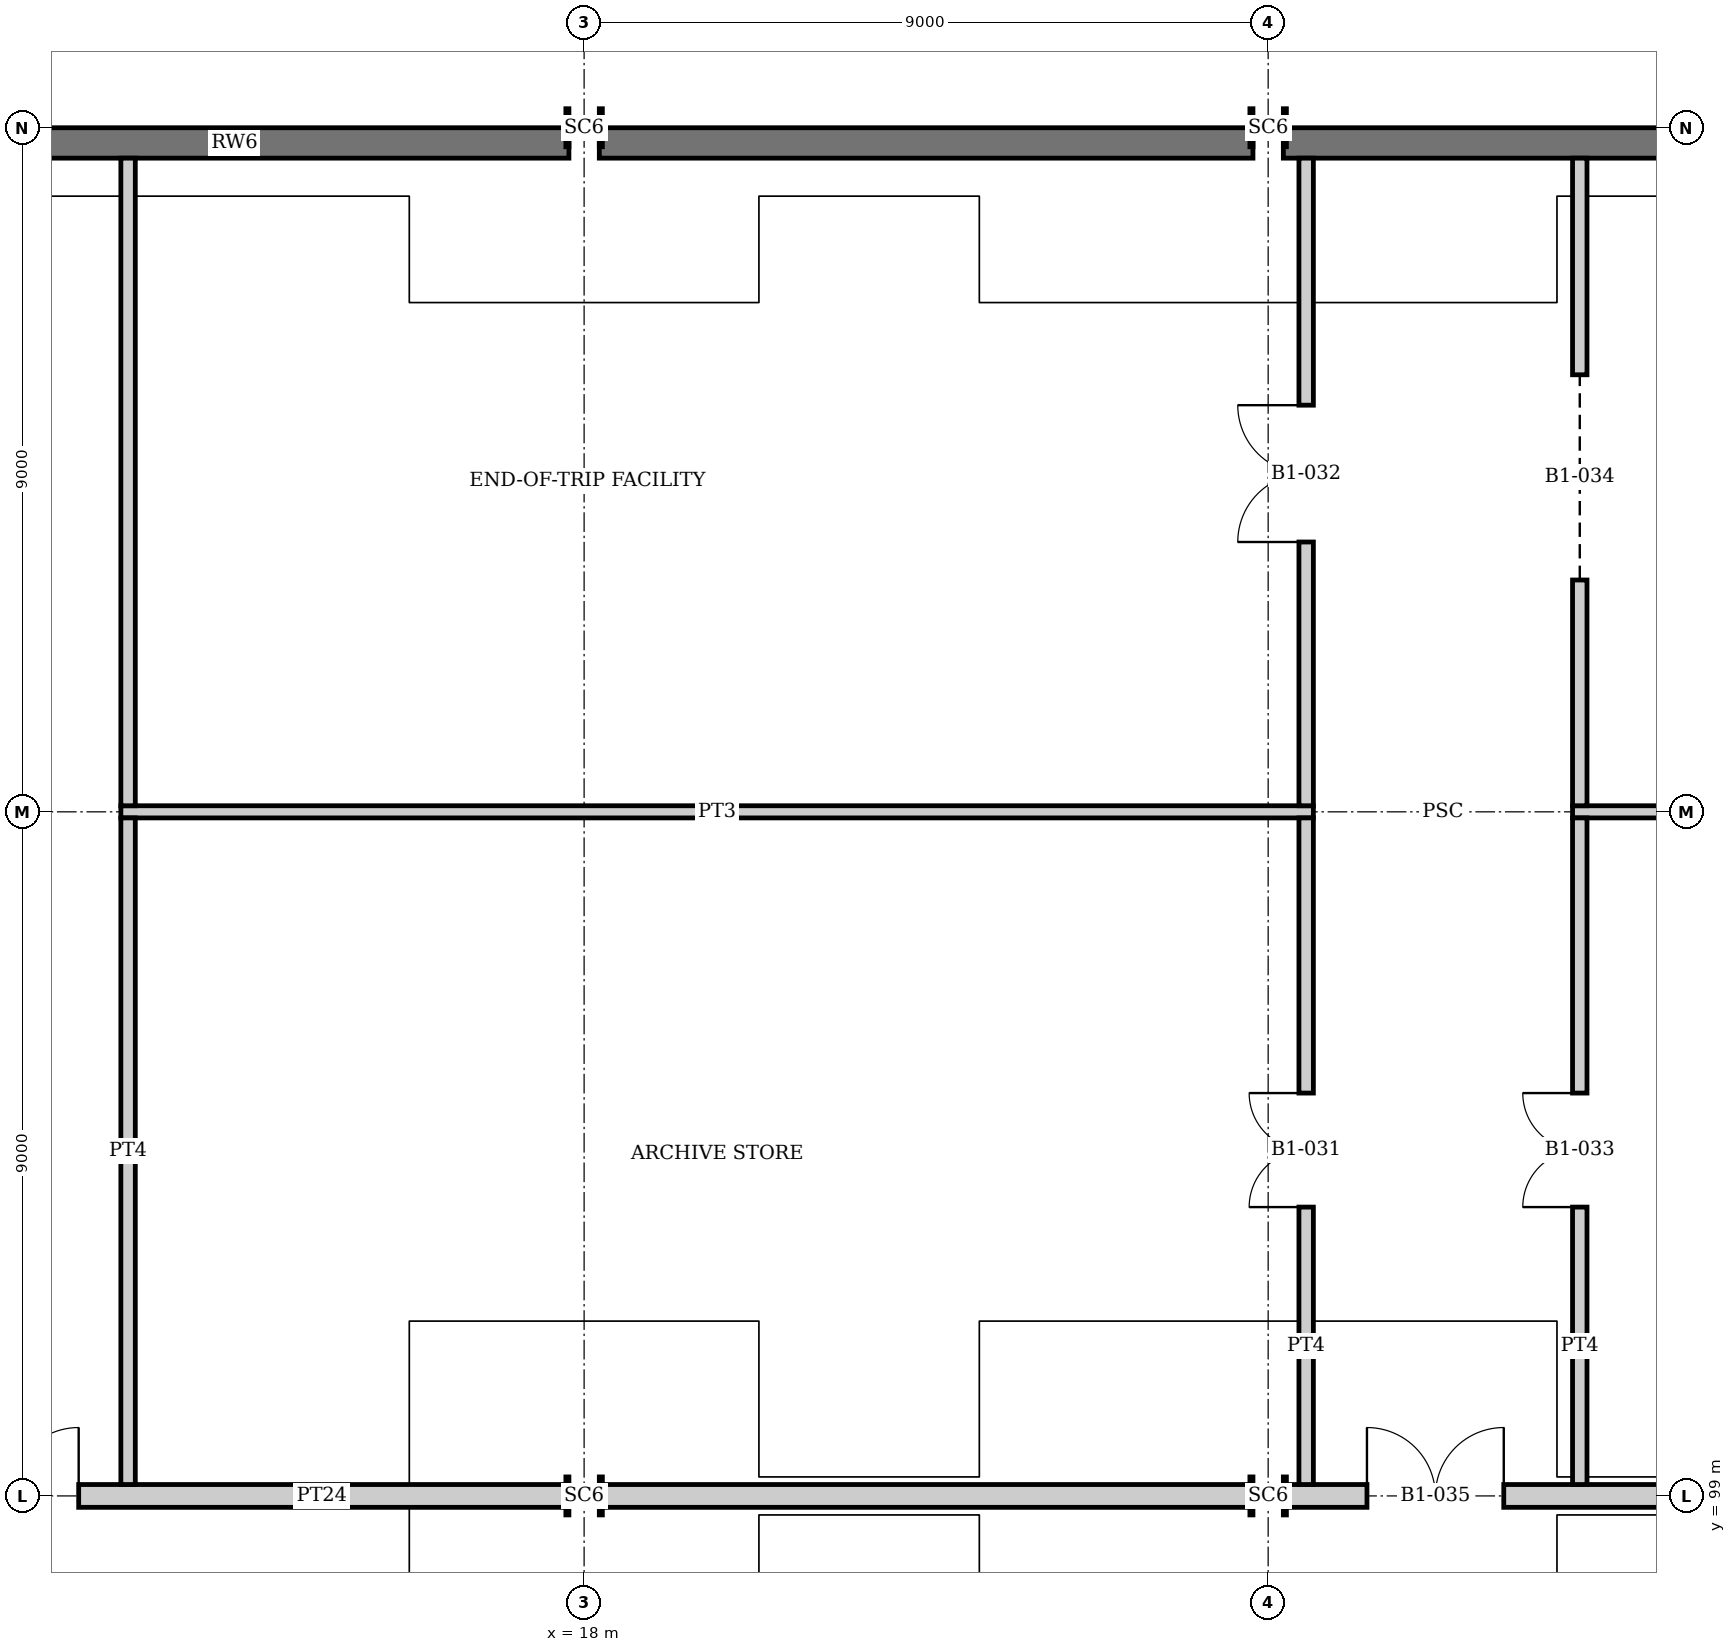
"""IFC4 building model, lengths in metres.
Left out: names, types, materials, properties, quantities, classifications, styles, units other than length and angle.
Written with IfcOpenShell. Run it as: python <this file> out.ifc"""

import sys

from ifc_helpers import new_model, si_unit, direction, frame, frame_2d, origin, origin_2d, place, context, subcontext, project, spatial, rectangle, i_section, extrude, element, fill, save


model = new_model("IFC4")
c1 = context("Model", 3, precision=1e-05, world=origin(), true_north=direction((0.0, 1.0)))
c2 = subcontext(c1, "Body", "Model", "MODEL_VIEW")
j1 = project(units=[si_unit("LENGTHUNIT", "METRE"), si_unit("PLANEANGLEUNIT", "RADIAN")], contexts=[c1])
p1 = place(None, origin())
s1 = spatial("IfcSite", under=j1, at=p1, CompositionType="ELEMENT")
p2 = place(p1, origin())
s2 = spatial("IfcBuilding", under=s1, at=p2, CompositionType="ELEMENT")
p3 = place(p2, frame((0.0, 0.0, -4.5)))
s3 = spatial("IfcBuildingStorey", under=s2, at=p3, CompositionType="ELEMENT", Elevation=-4.5)
for number, where, z_axis, x_axis in (
    (1, (18.0, 99.0, 0.0), (0.0, 0.0, 1.0), (0.0, 1.0, 0.0)),
    (2, (18.0, 117.0, 0.0), (0.0, 0.0, 1.0), (0.0, 1.0, 0.0)),
    (3, (27.0, 99.0, 0.0), (0.0, 0.0, 1.0), (0.0, 1.0, 0.0)),
    (4, (27.0, 117.0, 0.0), (0.0, 0.0, 1.0), (0.0, 1.0, 0.0)),
):
    element("IfcColumn", number, at=place(p3, frame(where, z_axis=z_axis, x_axis=x_axis)), inside=s3, PredefinedType="COLUMN", context=c2, shape_type="SweptSolid", body=[
        extrude(i_section(OverallWidth=0.5, OverallDepth=0.48, WebThickness=0.04, FlangeThickness=0.04, at=origin_2d()), origin(), (0.0, 0.0, 1.0), 4.5),
    ])
p4 = place(p3, frame((9.0, 116.8, 0.0), z_axis=(0.0, 0.0, 1.0), x_axis=(1.0, 0.0, 0.0)))
e5 = element("IfcWall", 5, at=p4, inside=s3, PredefinedType="SOLIDWALL", context=c2, shape_type="SweptSolid", body=[
    extrude(rectangle(XDim=8.8, YDim=0.4, at=frame_2d((4.4, 0.0))), origin(), (0.0, 0.0, 1.0), 4.5),
])
for number, where, z_axis, x_axis in (
    (6, (18.2, 116.8, 0.0), (0.0, 0.0, 1.0), (1.0, 0.0, 0.0)),
    (7, (27.2, 116.8, 0.0), (0.0, 0.0, 1.0), (1.0, 0.0, 0.0)),
):
    element("IfcWall", number, at=place(p3, frame(where, z_axis=z_axis, x_axis=x_axis)), inside=s3, PredefinedType="SOLIDWALL", context=c2, shape_type="SweptSolid", body=[
        extrude(rectangle(XDim=8.6, YDim=0.4, at=frame_2d((4.3, 0.0))), origin(), (0.0, 0.0, 1.0), 4.5),
    ])
p5 = place(p3, frame((9.0, 99.0, 0.0), z_axis=(0.0, 0.0, 1.0), x_axis=(1.0, 0.0, 0.0)))
e8 = element("IfcWall", 8, at=p5, inside=s3, PredefinedType="PARTITIONING", context=c2, shape_type="SweptSolid", body=[
    extrude(rectangle(XDim=8.75, YDim=0.3, at=frame_2d((4.375, 0.0))), origin(), (0.0, 0.0, 1.0), 3.34),
])
p6 = place(p5, frame((0.55, 0.0, 0.0)))
e9 = element("IfcOpeningElement", 9, at=p6, cuts=e8, PredefinedType="OPENING", context=c2, shape_type="SweptSolid", body=[
    extrude(rectangle(XDim=1.8, YDim=2.1, at=frame_2d((0.9, 1.05))), frame((0.0, 0.16, 0.0), z_axis=(0.0, -1.0, 0.0), x_axis=(1.0, 0.0, 0.0)), (0.0, 0.0, 1.0), 0.32),
])
p7 = place(p3, frame((18.25, 99.0, 0.0), z_axis=(0.0, 0.0, 1.0), x_axis=(1.0, 0.0, 0.0)))
e10 = element("IfcWall", 10, at=p7, inside=s3, PredefinedType="PARTITIONING", context=c2, shape_type="SweptSolid", body=[
    extrude(rectangle(XDim=8.5, YDim=0.3, at=frame_2d((4.25, 0.0))), origin(), (0.0, 0.0, 1.0), 3.34),
])
p8 = place(p3, frame((27.25, 99.0, 0.0), z_axis=(0.0, 0.0, 1.0), x_axis=(1.0, 0.0, 0.0)))
e11 = element("IfcWall", 11, at=p8, inside=s3, PredefinedType="PARTITIONING", context=c2, shape_type="SweptSolid", body=[
    extrude(rectangle(XDim=8.5, YDim=0.3, at=frame_2d((4.25, 0.0))), origin(), (0.0, 0.0, 1.0), 3.34),
])
p9 = place(p8, frame((1.05, 0.0, 0.0)))
e12 = element("IfcOpeningElement", 12, at=p9, cuts=e11, PredefinedType="OPENING", context=c2, shape_type="SweptSolid", body=[
    extrude(rectangle(XDim=1.8, YDim=2.1, at=frame_2d((0.9, 1.05))), frame((0.0, 0.16, 0.0), z_axis=(0.0, -1.0, 0.0), x_axis=(1.0, 0.0, 0.0)), (0.0, 0.0, 1.0), 0.32),
])
p10 = place(p3, frame((11.905, 108.0, 0.0), z_axis=(0.0, 0.0, 1.0), x_axis=(1.0, 0.0, 0.0)))
e13 = element("IfcWall", 13, at=p10, inside=s3, PredefinedType="PARTITIONING", context=c2, shape_type="SweptSolid", body=[
    extrude(rectangle(XDim=15.69, YDim=0.16, at=frame_2d((7.845, 0.0))), origin(), (0.0, 0.0, 1.0), 3.35),
])
p11 = place(p3, frame((31.005, 108.0, 0.0), z_axis=(0.0, 0.0, 1.0), x_axis=(1.0, 0.0, 0.0)))
e14 = element("IfcWall", 14, at=p11, inside=s3, PredefinedType="PARTITIONING", context=c2, shape_type="SweptSolid", body=[
    extrude(rectangle(XDim=11.09, YDim=0.16, at=frame_2d((5.545, 0.0))), origin(), (0.0, 0.0, 1.0), 3.35),
])
p12 = place(p3, frame((12.0, 99.15, 0.0), z_axis=(0.0, 0.0, 1.0), x_axis=(0.0, 1.0, 0.0)))
e15 = element("IfcWall", 15, at=p12, inside=s3, PredefinedType="PARTITIONING", context=c2, shape_type="SweptSolid", body=[
    extrude(rectangle(XDim=8.77, YDim=0.19, at=frame_2d((4.385, 0.0))), origin(), (0.0, 0.0, 1.0), 3.34),
])
p13 = place(p3, frame((12.0, 108.08, 0.0), z_axis=(0.0, 0.0, 1.0), x_axis=(0.0, 1.0, 0.0)))
e16 = element("IfcWall", 16, at=p13, inside=s3, PredefinedType="PARTITIONING", context=c2, shape_type="SweptSolid", body=[
    extrude(rectangle(XDim=8.52, YDim=0.19, at=frame_2d((4.26, 0.0))), origin(), (0.0, 0.0, 1.0), 4.25),
])
p14 = place(p3, frame((27.5, 99.15, 0.0), z_axis=(0.0, 0.0, 1.0), x_axis=(0.0, 1.0, 0.0)))
e17 = element("IfcWall", 17, at=p14, inside=s3, PredefinedType="PARTITIONING", context=c2, shape_type="SweptSolid", body=[
    extrude(rectangle(XDim=8.77, YDim=0.19, at=frame_2d((4.385, 0.0))), origin(), (0.0, 0.0, 1.0), 3.34),
])
p15 = place(p14, frame((3.65, 0.0, 0.0)))
e18 = element("IfcOpeningElement", 18, at=p15, cuts=e17, PredefinedType="OPENING", context=c2, shape_type="SweptSolid", body=[
    extrude(rectangle(XDim=1.5, YDim=2.1, at=frame_2d((0.75, 1.05))), frame((0.0, 0.105, 0.0), z_axis=(0.0, -1.0, 0.0), x_axis=(1.0, 0.0, 0.0)), (0.0, 0.0, 1.0), 0.21),
])
p16 = place(p3, frame((27.5, 108.08, 0.0), z_axis=(0.0, 0.0, 1.0), x_axis=(0.0, 1.0, 0.0)))
e19 = element("IfcWall", 19, at=p16, inside=s3, PredefinedType="PARTITIONING", context=c2, shape_type="SweptSolid", body=[
    extrude(rectangle(XDim=8.52, YDim=0.19, at=frame_2d((4.26, 0.0))), origin(), (0.0, 0.0, 1.0), 4.25),
])
p17 = place(p16, frame((3.47, 0.0, 0.0)))
e20 = element("IfcOpeningElement", 20, at=p17, cuts=e19, PredefinedType="OPENING", context=c2, shape_type="SweptSolid", body=[
    extrude(rectangle(XDim=1.8, YDim=2.1, at=frame_2d((0.9, 1.05))), frame((0.0, 0.105, 0.0), z_axis=(0.0, -1.0, 0.0), x_axis=(1.0, 0.0, 0.0)), (0.0, 0.0, 1.0), 0.21),
])
p18 = place(p3, frame((31.1, 99.15, 0.0), z_axis=(0.0, 0.0, 1.0), x_axis=(0.0, 1.0, 0.0)))
e21 = element("IfcWall", 21, at=p18, inside=s3, PredefinedType="PARTITIONING", context=c2, shape_type="SweptSolid", body=[
    extrude(rectangle(XDim=8.77, YDim=0.19, at=frame_2d((4.385, 0.0))), origin(), (0.0, 0.0, 1.0), 3.34),
])
p19 = place(p18, frame((3.65, 0.0, 0.0)))
e22 = element("IfcOpeningElement", 22, at=p19, cuts=e21, PredefinedType="OPENING", context=c2, shape_type="SweptSolid", body=[
    extrude(rectangle(XDim=1.5, YDim=2.1, at=frame_2d((0.75, 1.05))), frame((0.0, 0.105, 0.0), z_axis=(0.0, -1.0, 0.0), x_axis=(1.0, 0.0, 0.0)), (0.0, 0.0, 1.0), 0.21),
])
p20 = place(p3, frame((31.1, 108.08, 0.0), z_axis=(0.0, 0.0, 1.0), x_axis=(0.0, 1.0, 0.0)))
e23 = element("IfcWall", 23, at=p20, inside=s3, PredefinedType="PARTITIONING", context=c2, shape_type="SweptSolid", body=[
    extrude(rectangle(XDim=8.52, YDim=0.19, at=frame_2d((4.26, 0.0))), origin(), (0.0, 0.0, 1.0), 4.25),
])
p21 = place(p20, frame((2.97, 0.0, 0.0)))
e24 = element("IfcOpeningElement", 24, at=p21, cuts=e23, PredefinedType="OPENING", context=c2, shape_type="SweptSolid", body=[
    extrude(rectangle(XDim=2.7, YDim=3.0, at=frame_2d((1.35, 1.5))), frame((0.0, 0.105, 0.0), z_axis=(0.0, -1.0, 0.0), x_axis=(1.0, 0.0, 0.0)), (0.0, 0.0, 1.0), 0.21),
])
p22 = place(p15, origin())
e25 = element("IfcDoor", 25, at=p22, inside=s3, OperationType="DOUBLE_DOOR_SINGLE_SWING", PredefinedType="DOOR", context=c2, shape_type="SweptSolid", body=[
    extrude(rectangle(XDim=1.5, YDim=2.1, at=frame_2d((0.75, 1.05))), frame((0.0, 0.025, 0.0), z_axis=(0.0, -1.0, 0.0), x_axis=(1.0, 0.0, 0.0)), (0.0, 0.0, 1.0), 0.05),
])
fill(e18, e25)
p23 = place(p17, origin())
e26 = element("IfcDoor", 26, at=p23, inside=s3, OperationType="DOUBLE_DOOR_SINGLE_SWING", PredefinedType="DOOR", context=c2, shape_type="SweptSolid", body=[
    extrude(rectangle(XDim=1.8, YDim=2.1, at=frame_2d((0.9, 1.05))), frame((0.0, 0.025, 0.0), z_axis=(0.0, -1.0, 0.0), x_axis=(1.0, 0.0, 0.0)), (0.0, 0.0, 1.0), 0.05),
])
fill(e20, e26)
p24 = place(p19, origin())
e27 = element("IfcDoor", 27, at=p24, inside=s3, OperationType="DOUBLE_DOOR_SINGLE_SWING", PredefinedType="DOOR", context=c2, shape_type="SweptSolid", body=[
    extrude(rectangle(XDim=1.5, YDim=2.1, at=frame_2d((0.75, 1.05))), frame((0.0, 0.025, 0.0), z_axis=(0.0, -1.0, 0.0), x_axis=(1.0, 0.0, 0.0)), (0.0, 0.0, 1.0), 0.05),
])
fill(e22, e27)
p25 = place(p21, origin())
e28 = element("IfcDoor", 28, at=p25, inside=s3, OperationType="ROLLINGUP", PredefinedType="DOOR", context=c2, shape_type="SweptSolid", body=[
    extrude(rectangle(XDim=2.7, YDim=3.0, at=frame_2d((1.35, 1.5))), frame((0.0, 0.025, 0.0), z_axis=(0.0, -1.0, 0.0), x_axis=(1.0, 0.0, 0.0)), (0.0, 0.0, 1.0), 0.05),
])
fill(e24, e28)
p26 = place(p9, origin())
e29 = element("IfcDoor", 29, at=p26, inside=s3, OperationType="DOUBLE_DOOR_SINGLE_SWING", PredefinedType="DOOR", context=c2, shape_type="SweptSolid", body=[
    extrude(rectangle(XDim=1.8, YDim=2.1, at=frame_2d((0.9, 1.05))), frame((0.0, 0.025, 0.0), z_axis=(0.0, -1.0, 0.0), x_axis=(1.0, 0.0, 0.0)), (0.0, 0.0, 1.0), 0.05),
])
fill(e12, e29)
p27 = place(p6, origin())
e30 = element("IfcDoor", 30, at=p27, inside=s3, OperationType="DOUBLE_DOOR_SINGLE_SWING", PredefinedType="DOOR", context=c2, shape_type="SweptSolid", body=[
    extrude(rectangle(XDim=1.8, YDim=2.1, at=frame_2d((0.9, 1.05))), frame((0.0, 0.025, 0.0), z_axis=(0.0, -1.0, 0.0), x_axis=(1.0, 0.0, 0.0)), (0.0, 0.0, 1.0), 0.05),
])
fill(e9, e30)
save(model, sys.argv[1])
